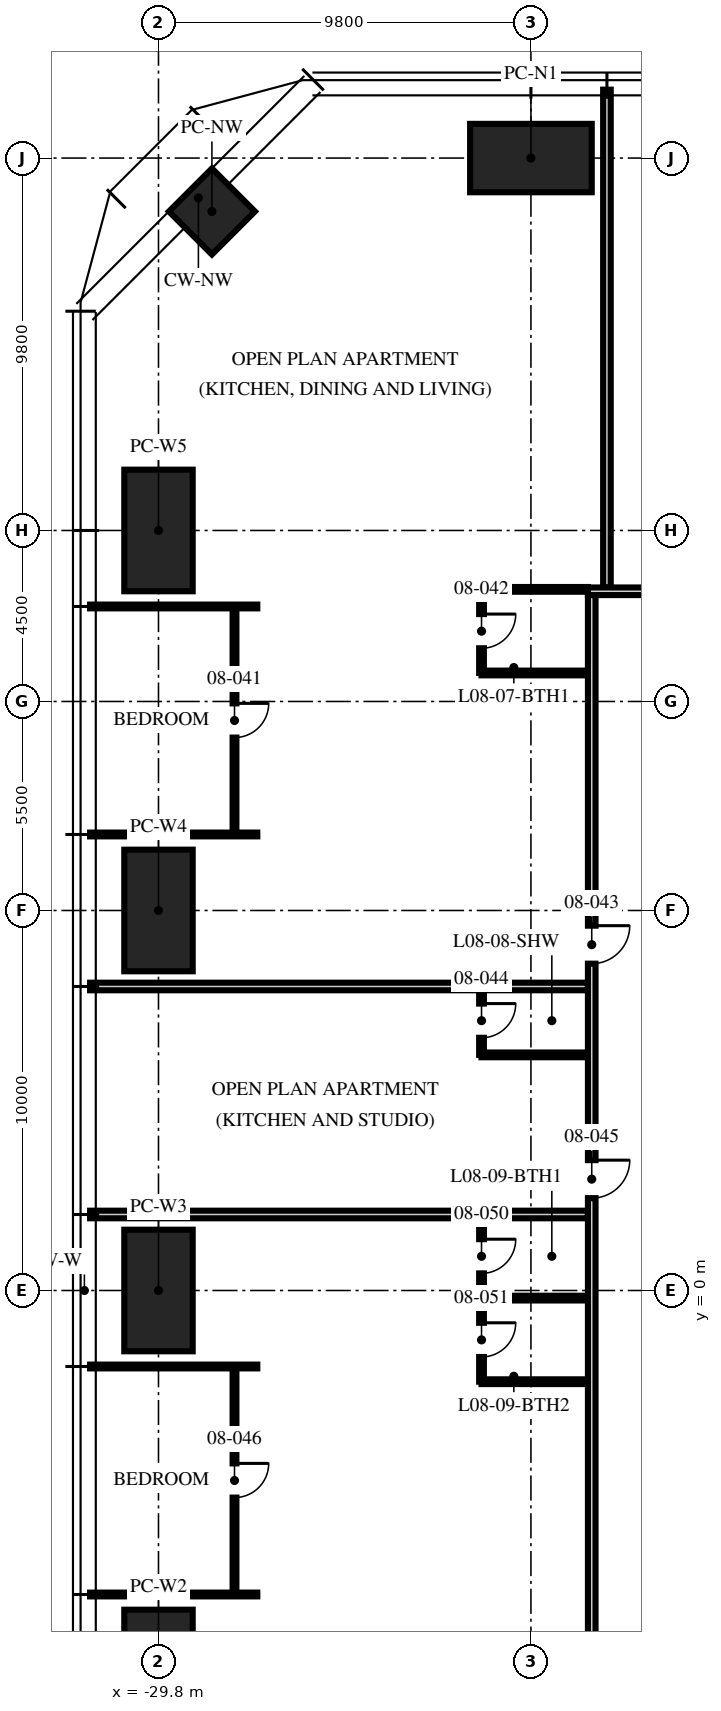
"""IFC4 building model, lengths in metres.
Left out: names, types, materials, properties, quantities, classifications, styles, units other than length and angle.
Written with IfcOpenShell. Run it as: python <this file> out.ifc"""

import sys

from ifc_helpers import new_model, si_unit, direction, frame, frame_2d, origin, origin_2d, place, context, subcontext, project, spatial, rectangle, hollow_rectangle, extrude, element, fill, save


model = new_model("IFC4")
c1 = context("Model", 3, precision=1e-05, world=origin(), true_north=direction((0.0, 1.0)))
c2 = subcontext(c1, "Body", "Model", "MODEL_VIEW")
j1 = project(units=[si_unit("LENGTHUNIT", "METRE"), si_unit("PLANEANGLEUNIT", "RADIAN")], contexts=[c1])
p1 = place(None, origin())
s1 = spatial("IfcSite", under=j1, at=p1, CompositionType="ELEMENT")
p2 = place(p1, origin())
s2 = spatial("IfcBuilding", under=s1, at=p2, CompositionType="ELEMENT")
p3 = place(p2, frame((0.0, 0.0, 36.0)))
s3 = spatial("IfcBuildingStorey", under=s2, at=p3, CompositionType="ELEMENT", Elevation=36.0)
for number, where, z_axis, x_axis in (
    (1, (-20.0, 29.8, 0.0), (0.0, 0.0, 1.0), (1.0, 0.0, 0.0)),
    (2, (-29.8, -10.0, 0.0), (0.0, 0.0, 1.0), (0.0, 1.0, 0.0)),
    (3, (-29.8, 0.0, 0.0), (0.0, 0.0, 1.0), (0.0, 1.0, 0.0)),
    (4, (-29.8, 10.0, 0.0), (0.0, 0.0, 1.0), (0.0, 1.0, 0.0)),
    (5, (-29.8, 20.0, 0.0), (0.0, 0.0, 1.0), (0.0, 1.0, 0.0)),
):
    element("IfcColumn", number, at=place(p3, frame(where, z_axis=z_axis, x_axis=x_axis)), inside=s3, PredefinedType="COLUMN", context=c2, shape_type="SweptSolid", body=[
        extrude(hollow_rectangle(XDim=3.2, YDim=1.8, WallThickness=0.2, at=origin_2d()), origin(), (0.0, 0.0, 1.0), 3.75),
    ])
p4 = place(p3, frame((-28.394, 28.394, 0.0), z_axis=(0.0, 0.0, 1.0), x_axis=(0.707106781187, 0.707106781187, 0.0)))
e6 = element("IfcColumn", 6, at=p4, inside=s3, PredefinedType="COLUMN", context=c2, shape_type="SweptSolid", body=[
    extrude(hollow_rectangle(XDim=1.6, YDim=1.6, WallThickness=0.1, at=origin_2d()), origin(), (0.0, 0.0, 1.0), 3.75),
])
p5 = place(p3, frame((-18.0, 18.5, 0.0), z_axis=(0.0, 0.0, 1.0), x_axis=(0.0, 1.0, 0.0)))
e7 = element("IfcWall", 7, at=p5, inside=s3, PredefinedType="PARTITIONING", context=c2, shape_type="SweptSolid", body=[
    extrude(rectangle(XDim=13.1, YDim=0.2, at=frame_2d((6.55, 0.0))), origin(), (0.0, 0.0, 1.0), 2.3),
])
for number, where, z_axis, x_axis in (
    (8, (-27.2, 18.0, 0.0), (0.0, 0.0, 1.0), (-1.0, 0.0, 0.0)),
    (9, (-27.2, 12.0, 0.0), (0.0, 0.0, 1.0), (-1.0, 0.0, 0.0)),
):
    element("IfcWall", number, at=place(p3, frame(where, z_axis=z_axis, x_axis=x_axis)), inside=s3, PredefinedType="PARTITIONING", context=c2, shape_type="SweptSolid", body=[
        extrude(rectangle(XDim=4.4, YDim=0.1, at=frame_2d((2.2, 0.0))), origin(), (0.0, 0.0, 1.0), 2.71),
    ])
for number, where, z_axis, x_axis in (
    (10, (-18.5, 8.0, 0.0), (0.0, 0.0, 1.0), (-1.0, 0.0, 0.0)),
    (11, (-18.5, 2.0, 0.0), (0.0, 0.0, 1.0), (-1.0, 0.0, 0.0)),
):
    element("IfcWall", number, at=place(p3, frame(where, z_axis=z_axis, x_axis=x_axis)), inside=s3, PredefinedType="PARTITIONING", context=c2, shape_type="SweptSolid", body=[
        extrude(rectangle(XDim=13.1, YDim=0.2, at=frame_2d((6.55, 0.0))), origin(), (0.0, 0.0, 1.0), 2.71),
    ])
for number, where, z_axis, x_axis in (
    (12, (-27.2, -2.0, 0.0), (0.0, 0.0, 1.0), (-1.0, 0.0, 0.0)),
    (13, (-27.2, -8.0, 0.0), (0.0, 0.0, 1.0), (-1.0, 0.0, 0.0)),
):
    element("IfcWall", number, at=place(p3, frame(where, z_axis=z_axis, x_axis=x_axis)), inside=s3, PredefinedType="PARTITIONING", context=c2, shape_type="SweptSolid", body=[
        extrude(rectangle(XDim=4.4, YDim=0.1, at=frame_2d((2.2, 0.0))), origin(), (0.0, 0.0, 1.0), 2.71),
    ])
p6 = place(p3, frame((-27.8, 18.0, 0.0), z_axis=(0.0, 0.0, 1.0), x_axis=(0.0, -1.0, 0.0)))
e14 = element("IfcWall", 14, at=p6, inside=s3, PredefinedType="PARTITIONING", context=c2, shape_type="SweptSolid", body=[
    extrude(rectangle(XDim=6.0, YDim=0.1, at=frame_2d((3.0, 0.0))), origin(), (0.0, 0.0, 1.0), 2.61),
])
p7 = place(p6, frame((2.55, 0.0, 0.0)))
e15 = element("IfcOpeningElement", 15, at=p7, cuts=e14, PredefinedType="OPENING", context=c2, shape_type="SweptSolid", body=[
    extrude(rectangle(XDim=0.9, YDim=2.1, at=frame_2d((0.45, 1.05))), frame((0.0, 0.06, 0.0), z_axis=(0.0, -1.0, 0.0), x_axis=(1.0, 0.0, 0.0)), (0.0, 0.0, 1.0), 0.12),
])
p8 = place(p3, frame((-21.3, 18.45, 0.0), z_axis=(0.0, 0.0, 1.0), x_axis=(0.0, -1.0, 0.0)))
e16 = element("IfcWall", 16, at=p8, inside=s3, PredefinedType="PARTITIONING", context=c2, shape_type="SweptSolid", body=[
    extrude(rectangle(XDim=2.2, YDim=0.125, at=frame_2d((1.1, 0.0))), origin(), (0.0, 0.0, 1.0), 3.5),
])
p9 = place(p8, frame((0.65, 0.0, 0.0)))
e17 = element("IfcOpeningElement", 17, at=p9, cuts=e16, PredefinedType="OPENING", context=c2, shape_type="SweptSolid", body=[
    extrude(rectangle(XDim=0.9, YDim=2.1, at=frame_2d((0.45, 1.05))), frame((0.0, 0.073, 0.0), z_axis=(0.0, -1.0, 0.0), x_axis=(1.0, 0.0, 0.0)), (0.0, 0.0, 1.0), 0.145),
])
p10 = place(p3, frame((-18.5, 18.45, 0.0), z_axis=(0.0, 0.0, 1.0), x_axis=(-1.0, 0.0, 0.0)))
e18 = element("IfcWall", 18, at=p10, inside=s3, PredefinedType="PARTITIONING", context=c2, shape_type="SweptSolid", body=[
    extrude(rectangle(XDim=2.8, YDim=0.125, at=frame_2d((1.4, 0.0))), origin(), (0.0, 0.0, 1.0), 2.3),
])
p11 = place(p3, frame((-18.5, 16.25, 0.0), z_axis=(0.0, 0.0, 1.0), x_axis=(-1.0, 0.0, 0.0)))
e19 = element("IfcWall", 19, at=p11, inside=s3, PredefinedType="PARTITIONING", context=c2, shape_type="SweptSolid", body=[
    extrude(rectangle(XDim=2.8, YDim=0.125, at=frame_2d((1.4, 0.0))), origin(), (0.0, 0.0, 1.0), 3.5),
])
p12 = place(p3, frame((-21.3, 8.0, 0.0), z_axis=(0.0, 0.0, 1.0), x_axis=(0.0, -1.0, 0.0)))
e20 = element("IfcWall", 20, at=p12, inside=s3, PredefinedType="PARTITIONING", context=c2, shape_type="SweptSolid", body=[
    extrude(rectangle(XDim=1.8, YDim=0.125, at=frame_2d((0.9, 0.0))), origin(), (0.0, 0.0, 1.0), 3.5),
])
p13 = place(p12, frame((0.45, 0.0, 0.0)))
e21 = element("IfcOpeningElement", 21, at=p13, cuts=e20, PredefinedType="OPENING", context=c2, shape_type="SweptSolid", body=[
    extrude(rectangle(XDim=0.9, YDim=2.1, at=frame_2d((0.45, 1.05))), frame((0.0, 0.073, 0.0), z_axis=(0.0, -1.0, 0.0), x_axis=(1.0, 0.0, 0.0)), (0.0, 0.0, 1.0), 0.145),
])
p14 = place(p3, frame((-18.5, 6.2, 0.0), z_axis=(0.0, 0.0, 1.0), x_axis=(-1.0, 0.0, 0.0)))
e22 = element("IfcWall", 22, at=p14, inside=s3, PredefinedType="PARTITIONING", context=c2, shape_type="SweptSolid", body=[
    extrude(rectangle(XDim=2.8, YDim=0.125, at=frame_2d((1.4, 0.0))), origin(), (0.0, 0.0, 1.0), 3.5),
])
p15 = place(p3, frame((-27.8, -2.0, 0.0), z_axis=(0.0, 0.0, 1.0), x_axis=(0.0, -1.0, 0.0)))
e23 = element("IfcWall", 23, at=p15, inside=s3, PredefinedType="PARTITIONING", context=c2, shape_type="SweptSolid", body=[
    extrude(rectangle(XDim=6.0, YDim=0.1, at=frame_2d((3.0, 0.0))), origin(), (0.0, 0.0, 1.0), 2.61),
])
p16 = place(p15, frame((2.55, 0.0, 0.0)))
e24 = element("IfcOpeningElement", 24, at=p16, cuts=e23, PredefinedType="OPENING", context=c2, shape_type="SweptSolid", body=[
    extrude(rectangle(XDim=0.9, YDim=2.1, at=frame_2d((0.45, 1.05))), frame((0.0, 0.06, 0.0), z_axis=(0.0, -1.0, 0.0), x_axis=(1.0, 0.0, 0.0)), (0.0, 0.0, 1.0), 0.12),
])
p17 = place(p3, frame((-21.3, 2.0, 0.0), z_axis=(0.0, 0.0, 1.0), x_axis=(0.0, -1.0, 0.0)))
e25 = element("IfcWall", 25, at=p17, inside=s3, PredefinedType="PARTITIONING", context=c2, shape_type="SweptSolid", body=[
    extrude(rectangle(XDim=4.4, YDim=0.125, at=frame_2d((2.2, 0.0))), origin(), (0.0, 0.0, 1.0), 2.492),
])
p18 = place(p17, frame((0.65, 0.0, 0.0)))
e26 = element("IfcOpeningElement", 26, at=p18, cuts=e25, PredefinedType="OPENING", context=c2, shape_type="SweptSolid", body=[
    extrude(rectangle(XDim=0.9, YDim=2.1, at=frame_2d((0.45, 1.05))), frame((0.0, 0.073, 0.0), z_axis=(0.0, -1.0, 0.0), x_axis=(1.0, 0.0, 0.0)), (0.0, 0.0, 1.0), 0.145),
])
p19 = place(p17, frame((2.85, 0.0, 0.0)))
e27 = element("IfcOpeningElement", 27, at=p19, cuts=e25, PredefinedType="OPENING", context=c2, shape_type="SweptSolid", body=[
    extrude(rectangle(XDim=0.9, YDim=2.1, at=frame_2d((0.45, 1.05))), frame((0.0, 0.073, 0.0), z_axis=(0.0, -1.0, 0.0), x_axis=(1.0, 0.0, 0.0)), (0.0, 0.0, 1.0), 0.145),
])
p20 = place(p3, frame((-18.5, -0.2, 0.0), z_axis=(0.0, 0.0, 1.0), x_axis=(-1.0, 0.0, 0.0)))
e28 = element("IfcWall", 28, at=p20, inside=s3, PredefinedType="PARTITIONING", context=c2, shape_type="SweptSolid", body=[
    extrude(rectangle(XDim=2.8, YDim=0.125, at=frame_2d((1.4, 0.0))), origin(), (0.0, 0.0, 1.0), 2.492),
])
p21 = place(p3, frame((-18.5, -2.4, 0.0), z_axis=(0.0, 0.0, 1.0), x_axis=(-1.0, 0.0, 0.0)))
e29 = element("IfcWall", 29, at=p21, inside=s3, PredefinedType="PARTITIONING", context=c2, shape_type="SweptSolid", body=[
    extrude(rectangle(XDim=2.8, YDim=0.125, at=frame_2d((1.4, 0.0))), origin(), (0.0, 0.0, 1.0), 3.5),
])
p22 = place(p3, frame((-18.5, 18.4, 0.0), z_axis=(0.0, 0.0, 1.0), x_axis=(1.0, 0.0, 0.0)))
e30 = element("IfcWall", 30, at=p22, inside=s3, PredefinedType="PARTITIONING", context=c2, shape_type="SweptSolid", body=[
    extrude(rectangle(XDim=4.5, YDim=0.2, at=frame_2d((2.25, 0.0))), origin(), (0.0, 0.0, 1.0), 2.3),
])
p23 = place(p3, frame((-18.4, 18.3, 0.0), z_axis=(0.0, 0.0, 1.0), x_axis=(0.0, -1.0, 0.0)))
e31 = element("IfcWall", 31, at=p23, inside=s3, PredefinedType="PARTITIONING", context=c2, shape_type="SweptSolid", body=[
    extrude(rectangle(XDim=36.6, YDim=0.2, at=frame_2d((18.3, 0.0))), origin(), (0.0, 0.0, 1.0), 2.3),
])
p24 = place(p23, frame((8.7, 0.0, 0.0)))
e32 = element("IfcOpeningElement", 32, at=p24, cuts=e31, PredefinedType="OPENING", context=c2, shape_type="SweptSolid", body=[
    extrude(rectangle(XDim=1.0, YDim=2.2, at=frame_2d((0.5, 1.1))), frame((0.0, 0.11, 0.0), z_axis=(0.0, -1.0, 0.0), x_axis=(1.0, 0.0, 0.0)), (0.0, 0.0, 1.0), 0.22),
])
p25 = place(p23, frame((14.87, 0.0, 0.0)))
e33 = element("IfcOpeningElement", 33, at=p25, cuts=e31, PredefinedType="OPENING", context=c2, shape_type="SweptSolid", body=[
    extrude(rectangle(XDim=1.0, YDim=2.2, at=frame_2d((0.5, 1.1))), frame((0.0, 0.11, 0.0), z_axis=(0.0, -1.0, 0.0), x_axis=(1.0, 0.0, 0.0)), (0.0, 0.0, 1.0), 0.22),
])
p26 = place(p23, frame((34.82, 0.0, 0.0)))
e34 = element("IfcOpeningElement", 34, at=p26, cuts=e31, PredefinedType="OPENING", context=c2, shape_type="SweptSolid", body=[
    extrude(rectangle(XDim=1.0, YDim=2.2, at=frame_2d((0.5, 1.1))), frame((0.0, 0.11, 0.0), z_axis=(0.0, -1.0, 0.0), x_axis=(1.0, 0.0, 0.0)), (0.0, 0.0, 1.0), 0.22),
])
p27 = place(p7, origin())
e35 = element("IfcDoor", 35, at=p27, inside=s3, OperationType="SINGLE_SWING_LEFT", PredefinedType="DOOR", context=c2, shape_type="SweptSolid", body=[
    extrude(rectangle(XDim=0.9, YDim=2.1, at=frame_2d((0.45, 1.05))), frame((0.0, 0.025, 0.0), z_axis=(0.0, -1.0, 0.0), x_axis=(1.0, 0.0, 0.0)), (0.0, 0.0, 1.0), 0.05),
])
fill(e15, e35)
p28 = place(p9, origin())
e36 = element("IfcDoor", 36, at=p28, inside=s3, OperationType="SINGLE_SWING_LEFT", PredefinedType="DOOR", context=c2, shape_type="SweptSolid", body=[
    extrude(rectangle(XDim=0.9, YDim=2.1, at=frame_2d((0.45, 1.05))), frame((0.0, 0.025, 0.0), z_axis=(0.0, -1.0, 0.0), x_axis=(1.0, 0.0, 0.0)), (0.0, 0.0, 1.0), 0.05),
])
fill(e17, e36)
p29 = place(p24, origin())
e37 = element("IfcDoor", 37, at=p29, inside=s3, OperationType="SINGLE_SWING_LEFT", PredefinedType="DOOR", context=c2, shape_type="SweptSolid", body=[
    extrude(rectangle(XDim=1.0, YDim=2.2, at=frame_2d((0.5, 1.1))), frame((0.0, 0.025, 0.0), z_axis=(0.0, -1.0, 0.0), x_axis=(1.0, 0.0, 0.0)), (0.0, 0.0, 1.0), 0.05),
])
fill(e32, e37)
p30 = place(p13, origin())
e38 = element("IfcDoor", 38, at=p30, inside=s3, OperationType="SINGLE_SWING_LEFT", PredefinedType="DOOR", context=c2, shape_type="SweptSolid", body=[
    extrude(rectangle(XDim=0.9, YDim=2.1, at=frame_2d((0.45, 1.05))), frame((0.0, 0.025, 0.0), z_axis=(0.0, -1.0, 0.0), x_axis=(1.0, 0.0, 0.0)), (0.0, 0.0, 1.0), 0.05),
])
fill(e21, e38)
p31 = place(p25, origin())
e39 = element("IfcDoor", 39, at=p31, inside=s3, OperationType="SINGLE_SWING_LEFT", PredefinedType="DOOR", context=c2, shape_type="SweptSolid", body=[
    extrude(rectangle(XDim=1.0, YDim=2.2, at=frame_2d((0.5, 1.1))), frame((0.0, 0.025, 0.0), z_axis=(0.0, -1.0, 0.0), x_axis=(1.0, 0.0, 0.0)), (0.0, 0.0, 1.0), 0.05),
])
fill(e33, e39)
p32 = place(p16, origin())
e40 = element("IfcDoor", 40, at=p32, inside=s3, OperationType="SINGLE_SWING_LEFT", PredefinedType="DOOR", context=c2, shape_type="SweptSolid", body=[
    extrude(rectangle(XDim=0.9, YDim=2.1, at=frame_2d((0.45, 1.05))), frame((0.0, 0.025, 0.0), z_axis=(0.0, -1.0, 0.0), x_axis=(1.0, 0.0, 0.0)), (0.0, 0.0, 1.0), 0.05),
])
fill(e24, e40)
p33 = place(p18, origin())
e41 = element("IfcDoor", 41, at=p33, inside=s3, OperationType="SINGLE_SWING_LEFT", PredefinedType="DOOR", context=c2, shape_type="SweptSolid", body=[
    extrude(rectangle(XDim=0.9, YDim=2.1, at=frame_2d((0.45, 1.05))), frame((0.0, 0.025, 0.0), z_axis=(0.0, -1.0, 0.0), x_axis=(1.0, 0.0, 0.0)), (0.0, 0.0, 1.0), 0.05),
])
fill(e26, e41)
p34 = place(p19, origin())
e42 = element("IfcDoor", 42, at=p34, inside=s3, OperationType="SINGLE_SWING_LEFT", PredefinedType="DOOR", context=c2, shape_type="SweptSolid", body=[
    extrude(rectangle(XDim=0.9, YDim=2.1, at=frame_2d((0.45, 1.05))), frame((0.0, 0.025, 0.0), z_axis=(0.0, -1.0, 0.0), x_axis=(1.0, 0.0, 0.0)), (0.0, 0.0, 1.0), 0.05),
])
fill(e27, e42)
save(model, sys.argv[1])
